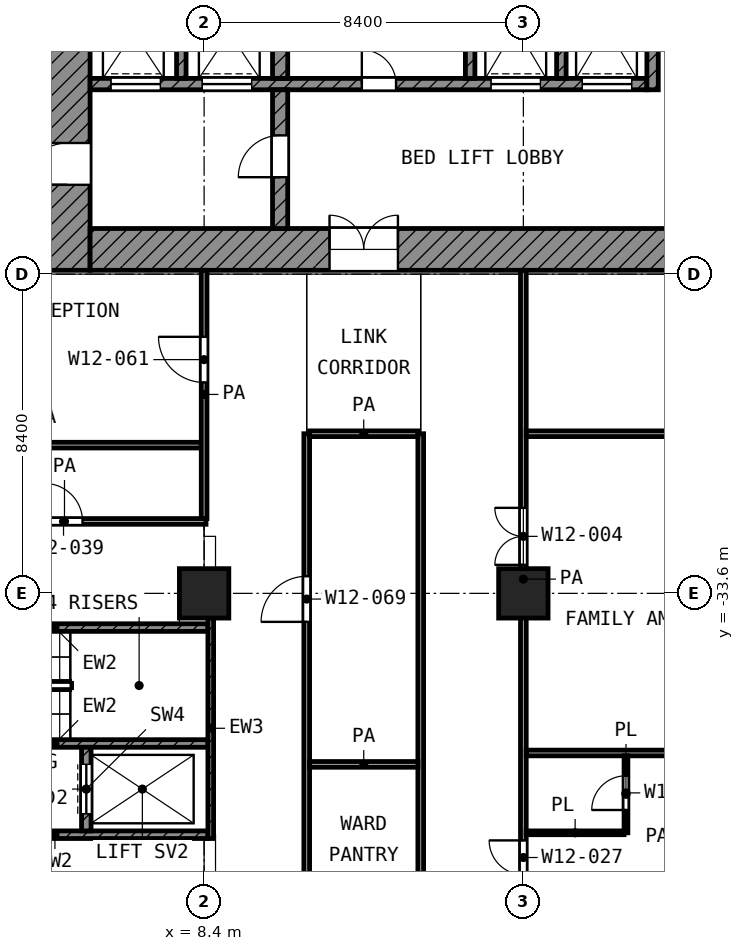
"""IFC4 building model, lengths in metres.
Left out: names, types, materials, properties, quantities, classifications, styles, units other than length and angle.
Written with IfcOpenShell. Run it as: python <this file> out.ifc"""

import sys

from ifc_helpers import new_model, si_unit, direction, frame, frame_2d, origin, origin_2d, place, context, subcontext, project, spatial, rectangle, extrude, element, fill, save


model = new_model("IFC4")
c1 = context("Model", 3, precision=1e-05, world=origin(), true_north=direction((0.0, 1.0)))
c2 = subcontext(c1, "Body", "Model", "MODEL_VIEW")
j1 = project(units=[si_unit("LENGTHUNIT", "METRE"), si_unit("PLANEANGLEUNIT", "RADIAN")], contexts=[c1])
p1 = place(None, origin())
s1 = spatial("IfcSite", under=j1, at=p1, CompositionType="ELEMENT")
p2 = place(p1, origin())
s2 = spatial("IfcBuilding", under=s1, at=p2, CompositionType="ELEMENT")
p3 = place(p2, frame((0.0, 0.0, 56.0)))
s3 = spatial("IfcBuildingStorey", under=s2, at=p3, CompositionType="ELEMENT", Elevation=56.0)
for number, where, z_axis, x_axis in (
    (1, (8.4, -33.6, 0.0), (0.0, 0.0, 1.0), (1.0, 0.0, 0.0)),
    (2, (16.8, -33.6, 0.0), (0.0, 0.0, 1.0), (1.0, 0.0, 0.0)),
):
    element("IfcColumn", number, at=place(p3, frame(where, z_axis=z_axis, x_axis=x_axis)), inside=s3, PredefinedType="COLUMN", context=c2, shape_type="SweptSolid", body=[
        extrude(rectangle(XDim=1.3, YDim=1.3, at=origin_2d()), origin(), (0.0, 0.0, 1.0), 4.2),
    ])
p4 = place(p3, frame((4.8, -25.1, 0.0), z_axis=(0.0, 0.0, 1.0), x_axis=(0.0, 1.0, 0.0)))
e3 = element("IfcWall", 3, at=p4, inside=s3, PredefinedType="SHEAR", context=c2, shape_type="SweptSolid", body=[
    extrude(rectangle(XDim=19.7, YDim=1.2, at=frame_2d((9.85, 0.0))), origin(), (0.0, 0.0, 1.0), 3.9),
])
p5 = place(p4, frame((11.55, 0.0, 0.0)))
e4 = element("IfcOpeningElement", 4, at=p5, cuts=e3, PredefinedType="OPENING", context=c2, shape_type="SweptSolid", body=[
    extrude(rectangle(XDim=1.1, YDim=2.1, at=frame_2d((0.55, 1.05))), frame((0.0, 0.61, 0.0), z_axis=(0.0, -1.0, 0.0), x_axis=(1.0, 0.0, 0.0)), (0.0, 0.0, 1.0), 1.22),
])
p6 = place(p4, frame((2.25, 0.0, 0.0)))
e5 = element("IfcOpeningElement", 5, at=p6, cuts=e3, PredefinedType="OPENING", context=c2, shape_type="SweptSolid", body=[
    extrude(rectangle(XDim=1.1, YDim=2.1, at=frame_2d((0.55, 1.05))), frame((0.0, 0.61, 0.0), z_axis=(0.0, -1.0, 0.0), x_axis=(1.0, 0.0, 0.0)), (0.0, 0.0, 1.0), 1.22),
])
p7 = place(p3, frame((5.4, -24.55, 0.0), z_axis=(0.0, 0.0, 1.0), x_axis=(1.0, 0.0, 0.0)))
e6 = element("IfcWall", 6, at=p7, inside=s3, PredefinedType="SHEAR", context=c2, shape_type="SweptSolid", body=[
    extrude(rectangle(XDim=18.6, YDim=1.1, at=frame_2d((9.3, 0.0))), origin(), (0.0, 0.0, 1.0), 3.9),
])
p8 = place(p7, frame((6.3, 0.0, 0.0)))
e7 = element("IfcOpeningElement", 7, at=p8, cuts=e6, PredefinedType="OPENING", context=c2, shape_type="SweptSolid", body=[
    extrude(rectangle(XDim=1.8, YDim=2.1, at=frame_2d((0.9, 1.05))), frame((0.0, 0.56, 0.0), z_axis=(0.0, -1.0, 0.0), x_axis=(1.0, 0.0, 0.0)), (0.0, 0.0, 1.0), 1.12),
])
p9 = place(p3, frame((5.4, -20.2, 0.0), z_axis=(0.0, 0.0, 1.0), x_axis=(1.0, 0.0, 0.0)))
e8 = element("IfcWall", 8, at=p9, inside=s3, PredefinedType="SHEAR", context=c2, shape_type="SweptSolid", body=[
    extrude(rectangle(XDim=14.65, YDim=0.3, at=frame_2d((7.325, 0.0))), origin(), (0.0, 0.0, 1.0), 3.9),
])
p10 = place(p9, frame((10.55, 0.0, 0.0)))
e9 = element("IfcOpeningElement", 9, at=p10, cuts=e8, PredefinedType="OPENING", context=c2, shape_type="SweptSolid", body=[
    extrude(rectangle(XDim=1.3, YDim=2.1, at=frame_2d((0.65, 1.05))), frame((0.0, 0.16, 0.0), z_axis=(0.0, -1.0, 0.0), x_axis=(1.0, 0.0, 0.0)), (0.0, 0.0, 1.0), 0.32),
])
p11 = place(p9, frame((12.95, 0.0, 0.0)))
e10 = element("IfcOpeningElement", 10, at=p11, cuts=e8, PredefinedType="OPENING", context=c2, shape_type="SweptSolid", body=[
    extrude(rectangle(XDim=1.3, YDim=2.1, at=frame_2d((0.65, 1.05))), frame((0.0, 0.16, 0.0), z_axis=(0.0, -1.0, 0.0), x_axis=(1.0, 0.0, 0.0)), (0.0, 0.0, 1.0), 0.32),
])
p12 = place(p9, frame((0.55, 0.0, 0.0)))
e11 = element("IfcOpeningElement", 11, at=p12, cuts=e8, PredefinedType="OPENING", context=c2, shape_type="SweptSolid", body=[
    extrude(rectangle(XDim=1.3, YDim=2.1, at=frame_2d((0.65, 1.05))), frame((0.0, 0.16, 0.0), z_axis=(0.0, -1.0, 0.0), x_axis=(1.0, 0.0, 0.0)), (0.0, 0.0, 1.0), 0.32),
])
p13 = place(p9, frame((2.95, 0.0, 0.0)))
e12 = element("IfcOpeningElement", 12, at=p13, cuts=e8, PredefinedType="OPENING", context=c2, shape_type="SweptSolid", body=[
    extrude(rectangle(XDim=1.3, YDim=2.1, at=frame_2d((0.65, 1.05))), frame((0.0, 0.16, 0.0), z_axis=(0.0, -1.0, 0.0), x_axis=(1.0, 0.0, 0.0)), (0.0, 0.0, 1.0), 0.32),
])
p14 = place(p9, frame((7.15, 0.0, 0.0)))
e13 = element("IfcOpeningElement", 13, at=p14, cuts=e8, PredefinedType="OPENING", context=c2, shape_type="SweptSolid", body=[
    extrude(rectangle(XDim=0.9, YDim=2.1, at=frame_2d((0.45, 1.05))), frame((0.0, 0.16, 0.0), z_axis=(0.0, -1.0, 0.0), x_axis=(1.0, 0.0, 0.0)), (0.0, 0.0, 1.0), 0.32),
])
p15 = place(p3, frame((10.4, -24.0, 0.0), z_axis=(0.0, 0.0, 1.0), x_axis=(0.0, 1.0, 0.0)))
e14 = element("IfcWall", 14, at=p15, inside=s3, PredefinedType="SHEAR", context=c2, shape_type="SweptSolid", body=[
    extrude(rectangle(XDim=3.65, YDim=0.4, at=frame_2d((1.825, 0.0))), origin(), (0.0, 0.0, 1.0), 3.9),
])
p16 = place(p15, frame((1.35, 0.0, 0.0)))
e15 = element("IfcOpeningElement", 15, at=p16, cuts=e14, PredefinedType="OPENING", context=c2, shape_type="SweptSolid", body=[
    extrude(rectangle(XDim=1.1, YDim=2.1, at=frame_2d((0.55, 1.05))), frame((0.0, 0.21, 0.0), z_axis=(0.0, -1.0, 0.0), x_axis=(1.0, 0.0, 0.0)), (0.0, 0.0, 1.0), 0.42),
])
p17 = place(p3, frame((10.4, -20.05, 0.0), z_axis=(0.0, 0.0, 1.0), x_axis=(0.0, 1.0, 0.0)))
e16 = element("IfcWall", 16, at=p17, inside=s3, PredefinedType="SHEAR", context=c2, shape_type="SweptSolid", body=[
    extrude(rectangle(XDim=3.15, YDim=0.4, at=frame_2d((1.575, 0.0))), origin(), (0.0, 0.0, 1.0), 3.9),
])
p18 = place(p3, frame((20.2, -20.35, 0.0), z_axis=(0.0, 0.0, 1.0), x_axis=(0.0, 1.0, 0.0)))
e17 = element("IfcWall", 17, at=p18, inside=s3, PredefinedType="SHEAR", context=c2, shape_type="SweptSolid", body=[
    extrude(rectangle(XDim=3.45, YDim=0.3, at=frame_2d((1.725, 0.0))), origin(), (0.0, 0.0, 1.0), 3.9),
])
for number, where, z_axis, x_axis in (
    (18, (7.8, -20.05, 0.0), (0.0, 0.0, 1.0), (0.0, 1.0, 0.0)),
    (19, (15.4, -20.05, 0.0), (0.0, 0.0, 1.0), (0.0, 1.0, 0.0)),
    (20, (17.8, -20.05, 0.0), (0.0, 0.0, 1.0), (0.0, 1.0, 0.0)),
):
    element("IfcWall", number, at=place(p3, frame(where, z_axis=z_axis, x_axis=x_axis)), inside=s3, PredefinedType="SHEAR", context=c2, shape_type="SweptSolid", body=[
        extrude(rectangle(XDim=3.15, YDim=0.25, at=frame_2d((1.575, 0.0))), origin(), (0.0, 0.0, 1.0), 3.9),
    ])
p19 = place(p3, frame((8.575, -40.05, 0.0), z_axis=(0.0, 0.0, 1.0), x_axis=(0.0, 1.0, 0.0)))
e21 = element("IfcWall", 21, at=p19, inside=s3, PredefinedType="SHEAR", context=c2, shape_type="SweptSolid", body=[
    extrude(rectangle(XDim=5.8, YDim=0.15, at=frame_2d((2.9, 0.0))), origin(), (0.0, 0.0, 1.0), 3.9),
])
p20 = place(p3, frame((0.45, -34.5, 0.0), z_axis=(0.0, 0.0, 1.0), x_axis=(1.0, 0.0, 0.0)))
e22 = element("IfcWall", 22, at=p20, inside=s3, PredefinedType="SHEAR", context=c2, shape_type="SweptSolid", body=[
    extrude(rectangle(XDim=8.05, YDim=0.2, at=frame_2d((4.025, 0.0))), origin(), (0.0, 0.0, 1.0), 3.9),
])
p21 = place(p20, frame((0.75, 0.0, 0.0)))
e23 = element("IfcOpeningElement", 23, at=p21, cuts=e22, PredefinedType="OPENING", context=c2, shape_type="SweptSolid", body=[
    extrude(rectangle(XDim=1.1, YDim=2.1, at=frame_2d((0.55, 1.05))), frame((0.0, 0.11, 0.0), z_axis=(0.0, -1.0, 0.0), x_axis=(1.0, 0.0, 0.0)), (0.0, 0.0, 1.0), 0.22),
])
p22 = place(p3, frame((0.45, -37.55, 0.0), z_axis=(0.0, 0.0, 1.0), x_axis=(1.0, 0.0, 0.0)))
e24 = element("IfcWall", 24, at=p22, inside=s3, PredefinedType="SHEAR", context=c2, shape_type="SweptSolid", body=[
    extrude(rectangle(XDim=8.05, YDim=0.2, at=frame_2d((4.025, 0.0))), origin(), (0.0, 0.0, 1.0), 3.9),
])
p23 = place(p22, frame((0.1, 0.0, 0.0)))
e25 = element("IfcOpeningElement", 25, at=p23, cuts=e24, PredefinedType="OPENING", context=c2, shape_type="SweptSolid", body=[
    extrude(rectangle(XDim=1.1, YDim=2.1, at=frame_2d((0.55, 1.05))), frame((0.0, 0.11, 0.0), z_axis=(0.0, -1.0, 0.0), x_axis=(1.0, 0.0, 0.0)), (0.0, 0.0, 1.0), 0.22),
])
p24 = place(p3, frame((0.45, -39.95, 0.0), z_axis=(0.0, 0.0, 1.0), x_axis=(1.0, 0.0, 0.0)))
e26 = element("IfcWall", 26, at=p24, inside=s3, PredefinedType="SHEAR", context=c2, shape_type="SweptSolid", body=[
    extrude(rectangle(XDim=8.05, YDim=0.2, at=frame_2d((4.025, 0.0))), origin(), (0.0, 0.0, 1.0), 3.9),
])
p25 = place(p24, frame((2.0, 0.0, 0.0)))
e27 = element("IfcOpeningElement", 27, at=p25, cuts=e26, PredefinedType="OPENING", context=c2, shape_type="SweptSolid", body=[
    extrude(rectangle(XDim=1.1, YDim=2.1, at=frame_2d((0.55, 1.05))), frame((0.0, 0.11, 0.0), z_axis=(0.0, -1.0, 0.0), x_axis=(1.0, 0.0, 0.0)), (0.0, 0.0, 1.0), 0.22),
])
p26 = place(p3, frame((5.3, -39.85, 0.0), z_axis=(0.0, 0.0, 1.0), x_axis=(0.0, 1.0, 0.0)))
e28 = element("IfcWall", 28, at=p26, inside=s3, PredefinedType="SHEAR", context=c2, shape_type="SweptSolid", body=[
    extrude(rectangle(XDim=2.2, YDim=0.25, at=frame_2d((1.1, 0.0))), origin(), (0.0, 0.0, 1.0), 3.9),
])
p27 = place(p26, frame((0.45, 0.0, 0.0)))
e29 = element("IfcOpeningElement", 29, at=p27, cuts=e28, PredefinedType="OPENING", context=c2, shape_type="SweptSolid", body=[
    extrude(rectangle(XDim=1.3, YDim=2.1, at=frame_2d((0.65, 1.05))), frame((0.0, 0.135, 0.0), z_axis=(0.0, -1.0, 0.0), x_axis=(1.0, 0.0, 0.0)), (0.0, 0.0, 1.0), 0.27),
])
p28 = place(p3, frame((16.875, -39.9, 0.0), z_axis=(0.0, 0.0, 1.0), x_axis=(1.0, 0.0, 0.0)))
e30 = element("IfcWall", 30, at=p28, inside=s3, PredefinedType="PARTITIONING", context=c2, shape_type="SweptSolid", body=[
    extrude(rectangle(XDim=2.575, YDim=0.1, at=frame_2d((1.288, 0.0))), origin(), (0.0, 0.0, 1.0), 3.9),
])
p29 = place(p3, frame((19.5, -39.9, 0.0), z_axis=(0.0, 0.0, 1.0), x_axis=(0.0, 1.0, 0.0)))
e31 = element("IfcWall", 31, at=p29, inside=s3, PredefinedType="PARTITIONING", context=c2, shape_type="SweptSolid", body=[
    extrude(rectangle(XDim=2.025, YDim=0.1, at=frame_2d((1.012, 0.0))), origin(), (0.0, 0.0, 1.0), 3.9),
])
p30 = place(p29, frame((0.6, 0.0, 0.0)))
e32 = element("IfcOpeningElement", 32, at=p30, cuts=e31, PredefinedType="OPENING", context=c2, shape_type="SweptSolid", body=[
    extrude(rectangle(XDim=0.9, YDim=2.1, at=frame_2d((0.45, 1.05))), frame((0.0, 0.06, 0.0), z_axis=(0.0, -1.0, 0.0), x_axis=(1.0, 0.0, 0.0)), (0.0, 0.0, 1.0), 0.12),
])
p31 = place(p3, frame((11.175, -38.1, 0.0), z_axis=(0.0, 0.0, 1.0), x_axis=(1.0, 0.0, 0.0)))
e33 = element("IfcWall", 33, at=p31, inside=s3, PredefinedType="PARTITIONING", context=c2, shape_type="SweptSolid", body=[
    extrude(rectangle(XDim=2.85, YDim=0.15, at=frame_2d((1.425, 0.0))), origin(), (0.0, 0.0, 1.0), 3.9),
])
p32 = place(p3, frame((16.875, -37.8, 0.0), z_axis=(0.0, 0.0, 1.0), x_axis=(1.0, 0.0, 0.0)))
e34 = element("IfcWall", 34, at=p32, inside=s3, PredefinedType="PARTITIONING", context=c2, shape_type="SweptSolid", body=[
    extrude(rectangle(XDim=8.245, YDim=0.15, at=frame_2d((4.123, 0.0))), origin(), (0.0, 0.0, 1.0), 3.9),
])
p33 = place(p3, frame((1.002, -31.707, 0.0), z_axis=(0.0, 0.0, 1.0), x_axis=(1.0, 0.0, 0.0)))
e35 = element("IfcWall", 35, at=p33, inside=s3, PredefinedType="PARTITIONING", context=c2, shape_type="SweptSolid", body=[
    extrude(rectangle(XDim=7.448, YDim=0.15, at=frame_2d((3.724, 0.0))), origin(), (0.0, 0.0, 1.0), 3.9),
])
p34 = place(p33, frame((3.199, 0.0, 0.0)))
e36 = element("IfcOpeningElement", 36, at=p34, cuts=e35, PredefinedType="OPENING", context=c2, shape_type="SweptSolid", body=[
    extrude(rectangle(XDim=1.0, YDim=2.1, at=frame_2d((0.5, 1.05))), frame((0.0, 0.085, 0.0), z_axis=(0.0, -1.0, 0.0), x_axis=(1.0, 0.0, 0.0)), (0.0, 0.0, 1.0), 0.17),
])
p35 = place(p3, frame((0.08, -29.7, 0.0), z_axis=(0.0, 0.0, 1.0), x_axis=(1.0, 0.0, 0.0)))
e37 = element("IfcWall", 37, at=p35, inside=s3, PredefinedType="PARTITIONING", context=c2, shape_type="SweptSolid", body=[
    extrude(rectangle(XDim=8.245, YDim=0.15, at=frame_2d((4.123, 0.0))), origin(), (0.0, 0.0, 1.0), 3.9),
])
p36 = place(p3, frame((11.175, -29.4, 0.0), z_axis=(0.0, 0.0, 1.0), x_axis=(1.0, 0.0, 0.0)))
e38 = element("IfcWall", 38, at=p36, inside=s3, PredefinedType="PARTITIONING", context=c2, shape_type="SweptSolid", body=[
    extrude(rectangle(XDim=2.85, YDim=0.15, at=frame_2d((1.425, 0.0))), origin(), (0.0, 0.0, 1.0), 3.9),
])
p37 = place(p3, frame((16.875, -29.4, 0.0), z_axis=(0.0, 0.0, 1.0), x_axis=(1.0, 0.0, 0.0)))
e39 = element("IfcWall", 39, at=p37, inside=s3, PredefinedType="PARTITIONING", context=c2, shape_type="SweptSolid", body=[
    extrude(rectangle(XDim=8.25, YDim=0.15, at=frame_2d((4.125, 0.0))), origin(), (0.0, 0.0, 1.0), 3.9),
])
p38 = place(p3, frame((8.4, -31.632, 0.0), z_axis=(0.0, 0.0, 1.0), x_axis=(0.0, 1.0, 0.0)))
e40 = element("IfcWall", 40, at=p38, inside=s3, PredefinedType="PARTITIONING", context=c2, shape_type="SweptSolid", body=[
    extrude(rectangle(XDim=6.532, YDim=0.15, at=frame_2d((3.266, 0.0))), origin(), (0.0, 0.0, 1.0), 3.9),
])
p39 = place(p38, frame((3.582, 0.0, 0.0)))
e41 = element("IfcOpeningElement", 41, at=p39, cuts=e40, PredefinedType="OPENING", context=c2, shape_type="SweptSolid", body=[
    extrude(rectangle(XDim=1.2, YDim=2.1, at=frame_2d((0.6, 1.05))), frame((0.0, 0.085, 0.0), z_axis=(0.0, -1.0, 0.0), x_axis=(1.0, 0.0, 0.0)), (0.0, 0.0, 1.0), 0.17),
])
p40 = place(p3, frame((11.1, -68.7, 0.0), z_axis=(0.0, 0.0, 1.0), x_axis=(0.0, 1.0, 0.0)))
e42 = element("IfcWall", 42, at=p40, inside=s3, PredefinedType="PARTITIONING", context=c2, shape_type="SweptSolid", body=[
    extrude(rectangle(XDim=39.3, YDim=0.15, at=frame_2d((19.65, 0.0))), origin(), (0.0, 0.0, 1.0), 3.9),
])
p41 = place(p40, frame((34.35, 0.0, 0.0)))
e43 = element("IfcOpeningElement", 43, at=p41, cuts=e42, PredefinedType="OPENING", context=c2, shape_type="SweptSolid", body=[
    extrude(rectangle(XDim=1.2, YDim=2.1, at=frame_2d((0.6, 1.05))), frame((0.0, 0.085, 0.0), z_axis=(0.0, -1.0, 0.0), x_axis=(1.0, 0.0, 0.0)), (0.0, 0.0, 1.0), 0.17),
])
p42 = place(p40, frame((26.35, 0.0, 0.0)))
e44 = element("IfcOpeningElement", 44, at=p42, cuts=e42, PredefinedType="OPENING", context=c2, shape_type="SweptSolid", body=[
    extrude(rectangle(XDim=1.0, YDim=2.1, at=frame_2d((0.5, 1.05))), frame((0.0, 0.085, 0.0), z_axis=(0.0, -1.0, 0.0), x_axis=(1.0, 0.0, 0.0)), (0.0, 0.0, 1.0), 0.17),
])
p43 = place(p40, frame((6.55, 0.0, 0.0)))
e45 = element("IfcOpeningElement", 45, at=p43, cuts=e42, PredefinedType="OPENING", context=c2, shape_type="SweptSolid", body=[
    extrude(rectangle(XDim=1.0, YDim=2.1, at=frame_2d((0.5, 1.05))), frame((0.0, 0.085, 0.0), z_axis=(0.0, -1.0, 0.0), x_axis=(1.0, 0.0, 0.0)), (0.0, 0.0, 1.0), 0.17),
])
p44 = place(p3, frame((14.1, -68.7, 0.0), z_axis=(0.0, 0.0, 1.0), x_axis=(0.0, 1.0, 0.0)))
e46 = element("IfcWall", 46, at=p44, inside=s3, PredefinedType="PARTITIONING", context=c2, shape_type="SweptSolid", body=[
    extrude(rectangle(XDim=39.3, YDim=0.15, at=frame_2d((19.65, 0.0))), origin(), (0.0, 0.0, 1.0), 3.9),
])
p45 = place(p44, frame((18.1, 0.0, 0.0)))
e47 = element("IfcOpeningElement", 47, at=p45, cuts=e46, PredefinedType="OPENING", context=c2, shape_type="SweptSolid", body=[
    extrude(rectangle(XDim=1.0, YDim=2.1, at=frame_2d((0.5, 1.05))), frame((0.0, 0.085, 0.0), z_axis=(0.0, -1.0, 0.0), x_axis=(1.0, 0.0, 0.0)), (0.0, 0.0, 1.0), 0.17),
])
p46 = place(p3, frame((16.8, -41.35, 0.0), z_axis=(0.0, 0.0, 1.0), x_axis=(0.0, 1.0, 0.0)))
e48 = element("IfcWall", 48, at=p46, inside=s3, PredefinedType="PARTITIONING", context=c2, shape_type="SweptSolid", body=[
    extrude(rectangle(XDim=16.25, YDim=0.15, at=frame_2d((8.125, 0.0))), origin(), (0.0, 0.0, 1.0), 3.9),
])
p47 = place(p46, frame((8.5, 0.0, 0.0)))
e49 = element("IfcOpeningElement", 49, at=p47, cuts=e48, PredefinedType="OPENING", context=c2, shape_type="SweptSolid", body=[
    extrude(rectangle(XDim=1.5, YDim=2.1, at=frame_2d((0.75, 1.05))), frame((0.0, 0.085, 0.0), z_axis=(0.0, -1.0, 0.0), x_axis=(1.0, 0.0, 0.0)), (0.0, 0.0, 1.0), 0.17),
])
p48 = place(p46, frame((0.35, 0.0, 0.0)))
e50 = element("IfcOpeningElement", 50, at=p48, cuts=e48, PredefinedType="OPENING", context=c2, shape_type="SweptSolid", body=[
    extrude(rectangle(XDim=0.9, YDim=2.1, at=frame_2d((0.45, 1.05))), frame((0.0, 0.085, 0.0), z_axis=(0.0, -1.0, 0.0), x_axis=(1.0, 0.0, 0.0)), (0.0, 0.0, 1.0), 0.17),
])
p49 = place(p10, origin())
e51 = element("IfcDoor", 51, at=p49, inside=s3, OperationType="DOUBLE_DOOR_SLIDING", PredefinedType="DOOR", context=c2, shape_type="SweptSolid", body=[
    extrude(rectangle(XDim=1.3, YDim=2.1, at=frame_2d((0.65, 1.05))), frame((0.0, 0.025, 0.0), z_axis=(0.0, -1.0, 0.0), x_axis=(1.0, 0.0, 0.0)), (0.0, 0.0, 1.0), 0.05),
])
fill(e9, e51)
p50 = place(p11, origin())
e52 = element("IfcDoor", 52, at=p50, inside=s3, OperationType="DOUBLE_DOOR_SLIDING", PredefinedType="DOOR", context=c2, shape_type="SweptSolid", body=[
    extrude(rectangle(XDim=1.3, YDim=2.1, at=frame_2d((0.65, 1.05))), frame((0.0, 0.025, 0.0), z_axis=(0.0, -1.0, 0.0), x_axis=(1.0, 0.0, 0.0)), (0.0, 0.0, 1.0), 0.05),
])
fill(e10, e52)
p51 = place(p12, origin())
e53 = element("IfcDoor", 53, at=p51, inside=s3, OperationType="DOUBLE_DOOR_SLIDING", PredefinedType="DOOR", context=c2, shape_type="SweptSolid", body=[
    extrude(rectangle(XDim=1.3, YDim=2.1, at=frame_2d((0.65, 1.05))), frame((0.0, 0.025, 0.0), z_axis=(0.0, -1.0, 0.0), x_axis=(1.0, 0.0, 0.0)), (0.0, 0.0, 1.0), 0.05),
])
fill(e11, e53)
p52 = place(p13, origin())
e54 = element("IfcDoor", 54, at=p52, inside=s3, OperationType="DOUBLE_DOOR_SLIDING", PredefinedType="DOOR", context=c2, shape_type="SweptSolid", body=[
    extrude(rectangle(XDim=1.3, YDim=2.1, at=frame_2d((0.65, 1.05))), frame((0.0, 0.025, 0.0), z_axis=(0.0, -1.0, 0.0), x_axis=(1.0, 0.0, 0.0)), (0.0, 0.0, 1.0), 0.05),
])
fill(e12, e54)
p53 = place(p6, origin())
e55 = element("IfcDoor", 55, at=p53, inside=s3, OperationType="SINGLE_SWING_LEFT", PredefinedType="DOOR", context=c2, shape_type="SweptSolid", body=[
    extrude(rectangle(XDim=1.1, YDim=2.1, at=frame_2d((0.55, 1.05))), frame((0.0, 0.025, 0.0), z_axis=(0.0, -1.0, 0.0), x_axis=(1.0, 0.0, 0.0)), (0.0, 0.0, 1.0), 0.05),
])
fill(e5, e55)
p54 = place(p16, origin())
e56 = element("IfcDoor", 56, at=p54, inside=s3, OperationType="SINGLE_SWING_LEFT", PredefinedType="DOOR", context=c2, shape_type="SweptSolid", body=[
    extrude(rectangle(XDim=1.1, YDim=2.1, at=frame_2d((0.55, 1.05))), frame((0.0, 0.025, 0.0), z_axis=(0.0, -1.0, 0.0), x_axis=(1.0, 0.0, 0.0)), (0.0, 0.0, 1.0), 0.05),
])
fill(e15, e56)
p55 = place(p8, origin())
e57 = element("IfcDoor", 57, at=p55, inside=s3, OperationType="DOUBLE_DOOR_SINGLE_SWING", PredefinedType="DOOR", context=c2, shape_type="SweptSolid", body=[
    extrude(rectangle(XDim=1.8, YDim=2.1, at=frame_2d((0.9, 1.05))), frame((0.0, 0.025, 0.0), z_axis=(0.0, -1.0, 0.0), x_axis=(1.0, 0.0, 0.0)), (0.0, 0.0, 1.0), 0.05),
])
fill(e7, e57)
p56 = place(p14, origin())
e58 = element("IfcDoor", 58, at=p56, inside=s3, OperationType="SINGLE_SWING_LEFT", PredefinedType="DOOR", context=c2, shape_type="SweptSolid", body=[
    extrude(rectangle(XDim=0.9, YDim=2.1, at=frame_2d((0.45, 1.05))), frame((0.0, 0.025, 0.0), z_axis=(0.0, -1.0, 0.0), x_axis=(1.0, 0.0, 0.0)), (0.0, 0.0, 1.0), 0.05),
])
fill(e13, e58)
p57 = place(p27, origin())
e59 = element("IfcDoor", 59, at=p57, inside=s3, OperationType="DOUBLE_DOOR_SLIDING", PredefinedType="DOOR", context=c2, shape_type="SweptSolid", body=[
    extrude(rectangle(XDim=1.3, YDim=2.1, at=frame_2d((0.65, 1.05))), frame((0.0, 0.025, 0.0), z_axis=(0.0, -1.0, 0.0), x_axis=(1.0, 0.0, 0.0)), (0.0, 0.0, 1.0), 0.05),
])
fill(e29, e59)
p58 = place(p39, origin())
e60 = element("IfcDoor", 60, at=p58, inside=s3, OperationType="SINGLE_SWING_RIGHT", PredefinedType="DOOR", context=c2, shape_type="SweptSolid", body=[
    extrude(rectangle(XDim=1.2, YDim=2.1, at=frame_2d((0.6, 1.05))), frame((0.0, 0.025, 0.0), z_axis=(0.0, -1.0, 0.0), x_axis=(1.0, 0.0, 0.0)), (0.0, 0.0, 1.0), 0.05),
])
fill(e41, e60)
p59 = place(p34, origin())
e61 = element("IfcDoor", 61, at=p59, inside=s3, OperationType="SINGLE_SWING_LEFT", PredefinedType="DOOR", context=c2, shape_type="SweptSolid", body=[
    extrude(rectangle(XDim=1.0, YDim=2.1, at=frame_2d((0.5, 1.05))), frame((0.0, 0.025, 0.0), z_axis=(0.0, -1.0, 0.0), x_axis=(1.0, 0.0, 0.0)), (0.0, 0.0, 1.0), 0.05),
])
fill(e36, e61)
p60 = place(p41, origin())
e62 = element("IfcDoor", 62, at=p60, inside=s3, OperationType="SINGLE_SWING_LEFT", PredefinedType="DOOR", context=c2, shape_type="SweptSolid", body=[
    extrude(rectangle(XDim=1.2, YDim=2.1, at=frame_2d((0.6, 1.05))), frame((0.0, 0.025, 0.0), z_axis=(0.0, -1.0, 0.0), x_axis=(1.0, 0.0, 0.0)), (0.0, 0.0, 1.0), 0.05),
])
fill(e43, e62)
p61 = place(p47, origin())
e63 = element("IfcDoor", 63, at=p61, inside=s3, OperationType="DOUBLE_DOOR_SINGLE_SWING", PredefinedType="DOOR", context=c2, shape_type="SweptSolid", body=[
    extrude(rectangle(XDim=1.5, YDim=2.1, at=frame_2d((0.75, 1.05))), frame((0.0, 0.025, 0.0), z_axis=(0.0, -1.0, 0.0), x_axis=(1.0, 0.0, 0.0)), (0.0, 0.0, 1.0), 0.05),
])
fill(e49, e63)
p62 = place(p48, origin())
e64 = element("IfcDoor", 64, at=p62, inside=s3, OperationType="SINGLE_SWING_RIGHT", PredefinedType="DOOR", context=c2, shape_type="SweptSolid", body=[
    extrude(rectangle(XDim=0.9, YDim=2.1, at=frame_2d((0.45, 1.05))), frame((0.0, 0.025, 0.0), z_axis=(0.0, -1.0, 0.0), x_axis=(1.0, 0.0, 0.0)), (0.0, 0.0, 1.0), 0.05),
])
fill(e50, e64)
p63 = place(p30, origin())
e65 = element("IfcDoor", 65, at=p63, inside=s3, OperationType="SINGLE_SWING_LEFT", PredefinedType="DOOR", context=c2, shape_type="SweptSolid", body=[
    extrude(rectangle(XDim=0.9, YDim=2.1, at=frame_2d((0.45, 1.05))), frame((0.0, 0.025, 0.0), z_axis=(0.0, -1.0, 0.0), x_axis=(1.0, 0.0, 0.0)), (0.0, 0.0, 1.0), 0.05),
])
fill(e32, e65)
save(model, sys.argv[1])
